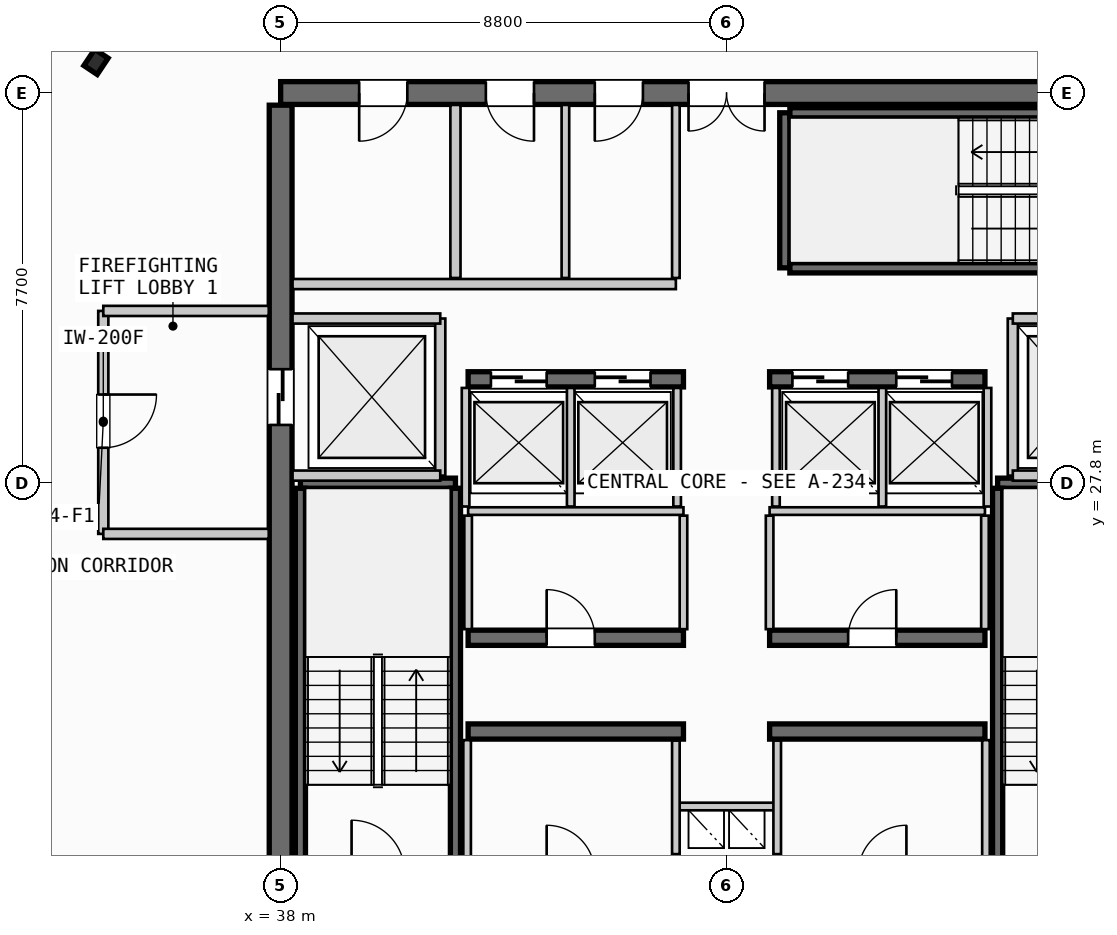
"""IFC4 building model, lengths in metres.
Left out: names, types, materials, properties, quantities, classifications, styles, units other than length and angle.
Written with IfcOpenShell. Run it as: python <this file> out.ifc"""

import sys

from ifc_helpers import new_model, si_unit, direction, frame, frame_2d, origin, origin_2d, place, context, subcontext, project, spatial, rectangle, i_section, extrude, source, transform, mapped, element, fill, save


model = new_model("IFC4")
c1 = context("Model", 3, precision=1e-05, world=origin(), true_north=direction((0.0, 1.0)))
c2 = subcontext(c1, "Body", "Model", "MODEL_VIEW")
j1 = project(units=[si_unit("LENGTHUNIT", "METRE"), si_unit("PLANEANGLEUNIT", "RADIAN")], contexts=[c1])
p1 = place(None, origin())
s1 = spatial("IfcSite", under=j1, at=p1, CompositionType="ELEMENT")
p2 = place(p1, origin())
s2 = spatial("IfcBuilding", under=s1, at=p2, CompositionType="ELEMENT")
p3 = place(p2, frame((0.0, 0.0, 245.65)))
s3 = spatial("IfcBuildingStorey", under=s2, at=p3, CompositionType="ELEMENT", Elevation=245.65)
p4 = place(p3, frame((55.6, 35.5, 0.0), z_axis=(0.0, 0.0, 1.0), x_axis=(-1.0, 0.0, 0.0)))
e1 = element("IfcWall", 1, at=p4, inside=s3, PredefinedType="SHEAR", context=c2, shape_type="SweptSolid", body=[
    extrude(rectangle(XDim=17.6, YDim=0.45, at=frame_2d((8.8, 0.0))), origin(), (0.0, 0.0, 1.0), 3.21),
])
p5 = place(p4, frame((8.05, 0.0, 0.0)))
e2 = element("IfcOpeningElement", 2, at=p5, cuts=e1, PredefinedType="OPENING", context=c2, shape_type="SweptSolid", body=[
    extrude(rectangle(XDim=1.5, YDim=2.2, at=frame_2d((0.75, 1.1))), frame((0.0, 0.235, 0.0), z_axis=(0.0, -1.0, 0.0), x_axis=(1.0, 0.0, 0.0)), (0.0, 0.0, 1.0), 0.47),
])
p6 = place(p4, frame((15.1, 0.0, 0.0)))
e3 = element("IfcOpeningElement", 3, at=p6, cuts=e1, PredefinedType="OPENING", context=c2, shape_type="SweptSolid", body=[
    extrude(rectangle(XDim=0.95, YDim=2.15, at=frame_2d((0.475, 1.075))), frame((0.0, 0.235, 0.0), z_axis=(0.0, -1.0, 0.0), x_axis=(1.0, 0.0, 0.0)), (0.0, 0.0, 1.0), 0.47),
])
p7 = place(p4, frame((12.6, 0.0, 0.0)))
e4 = element("IfcOpeningElement", 4, at=p7, cuts=e1, PredefinedType="OPENING", context=c2, shape_type="SweptSolid", body=[
    extrude(rectangle(XDim=0.95, YDim=2.15, at=frame_2d((0.475, 1.075))), frame((0.0, 0.235, 0.0), z_axis=(0.0, -1.0, 0.0), x_axis=(1.0, 0.0, 0.0)), (0.0, 0.0, 1.0), 0.47),
])
p8 = place(p4, frame((10.45, 0.0, 0.0)))
e5 = element("IfcOpeningElement", 5, at=p8, cuts=e1, PredefinedType="OPENING", context=c2, shape_type="SweptSolid", body=[
    extrude(rectangle(XDim=0.95, YDim=2.15, at=frame_2d((0.475, 1.075))), frame((0.0, 0.235, 0.0), z_axis=(0.0, -1.0, 0.0), x_axis=(1.0, 0.0, 0.0)), (0.0, 0.0, 1.0), 0.47),
])
p9 = place(p3, frame((38.0, 35.26, 0.0), z_axis=(0.0, 0.0, 1.0), x_axis=(0.0, -1.0, 0.0)))
e6 = element("IfcWall", 6, at=p9, inside=s3, PredefinedType="SHEAR", context=c2, shape_type="SweptSolid", body=[
    extrude(rectangle(XDim=14.92, YDim=0.45, at=frame_2d((7.46, 0.0))), origin(), (0.0, 0.0, 1.0), 3.21),
])
p10 = place(p9, frame((5.21, 0.0, 0.0)))
e7 = element("IfcOpeningElement", 7, at=p10, cuts=e6, PredefinedType="OPENING", context=c2, shape_type="SweptSolid", body=[
    extrude(rectangle(XDim=1.1, YDim=2.2, at=frame_2d((0.55, 1.1))), frame((0.0, 0.235, 0.0), z_axis=(0.0, -1.0, 0.0), x_axis=(1.0, 0.0, 0.0)), (0.0, 0.0, 1.0), 0.47),
])
for number, where, z_axis, x_axis in (
    (8, (41.7, 22.9, 0.0), (0.0, 0.0, 1.0), (1.0, 0.0, 0.0)),
    (9, (47.65, 22.9, 0.0), (0.0, 0.0, 1.0), (1.0, 0.0, 0.0)),
):
    element("IfcWall", number, at=place(p3, frame(where, z_axis=z_axis, x_axis=x_axis)), inside=s3, PredefinedType="SHEAR", context=c2, shape_type="SweptSolid", body=[
        extrude(rectangle(XDim=4.25, YDim=0.3, at=frame_2d((2.125, 0.0))), origin(), (0.0, 0.0, 1.0), 3.21),
    ])
p11 = place(p3, frame((41.7, 24.75, 0.0), z_axis=(0.0, 0.0, 1.0), x_axis=(1.0, 0.0, 0.0)))
e10 = element("IfcWall", 10, at=p11, inside=s3, PredefinedType="SHEAR", context=c2, shape_type="SweptSolid", body=[
    extrude(rectangle(XDim=4.25, YDim=0.3, at=frame_2d((2.125, 0.0))), origin(), (0.0, 0.0, 1.0), 3.21),
])
p12 = place(p11, frame((1.55, 0.0, 0.0)))
e11 = element("IfcOpeningElement", 11, at=p12, cuts=e10, PredefinedType="OPENING", context=c2, shape_type="SweptSolid", body=[
    extrude(rectangle(XDim=0.95, YDim=2.15, at=frame_2d((0.475, 1.075))), frame((0.0, 0.16, 0.0), z_axis=(0.0, -1.0, 0.0), x_axis=(1.0, 0.0, 0.0)), (0.0, 0.0, 1.0), 0.32),
])
p13 = place(p3, frame((47.65, 24.75, 0.0), z_axis=(0.0, 0.0, 1.0), x_axis=(1.0, 0.0, 0.0)))
e12 = element("IfcWall", 12, at=p13, inside=s3, PredefinedType="SHEAR", context=c2, shape_type="SweptSolid", body=[
    extrude(rectangle(XDim=4.25, YDim=0.3, at=frame_2d((2.125, 0.0))), origin(), (0.0, 0.0, 1.0), 3.21),
])
p14 = place(p13, frame((1.55, 0.0, 0.0)))
e13 = element("IfcOpeningElement", 13, at=p14, cuts=e12, PredefinedType="OPENING", context=c2, shape_type="SweptSolid", body=[
    extrude(rectangle(XDim=0.95, YDim=2.15, at=frame_2d((0.475, 1.075))), frame((0.0, 0.16, 0.0), z_axis=(0.0, -1.0, 0.0), x_axis=(1.0, 0.0, 0.0)), (0.0, 0.0, 1.0), 0.32),
])
p15 = place(p3, frame((41.7, 29.85, 0.0), z_axis=(0.0, 0.0, 1.0), x_axis=(1.0, 0.0, 0.0)))
e14 = element("IfcWall", 14, at=p15, inside=s3, PredefinedType="SHEAR", context=c2, shape_type="SweptSolid", body=[
    extrude(rectangle(XDim=4.25, YDim=0.3, at=frame_2d((2.125, 0.0))), origin(), (0.0, 0.0, 1.0), 3.21),
])
p16 = place(p15, frame((0.45, 0.0, 0.0)))
e15 = element("IfcOpeningElement", 15, at=p16, cuts=e14, PredefinedType="OPENING", context=c2, shape_type="SweptSolid", body=[
    extrude(rectangle(XDim=1.1, YDim=2.2, at=frame_2d((0.55, 1.1))), frame((0.0, 0.16, 0.0), z_axis=(0.0, -1.0, 0.0), x_axis=(1.0, 0.0, 0.0)), (0.0, 0.0, 1.0), 0.32),
])
p17 = place(p15, frame((2.5, 0.0, 0.0)))
e16 = element("IfcOpeningElement", 16, at=p17, cuts=e14, PredefinedType="OPENING", context=c2, shape_type="SweptSolid", body=[
    extrude(rectangle(XDim=1.1, YDim=2.2, at=frame_2d((0.55, 1.1))), frame((0.0, 0.16, 0.0), z_axis=(0.0, -1.0, 0.0), x_axis=(1.0, 0.0, 0.0)), (0.0, 0.0, 1.0), 0.32),
])
p18 = place(p3, frame((47.65, 29.85, 0.0), z_axis=(0.0, 0.0, 1.0), x_axis=(1.0, 0.0, 0.0)))
e17 = element("IfcWall", 17, at=p18, inside=s3, PredefinedType="SHEAR", context=c2, shape_type="SweptSolid", body=[
    extrude(rectangle(XDim=4.25, YDim=0.3, at=frame_2d((2.125, 0.0))), origin(), (0.0, 0.0, 1.0), 3.21),
])
p19 = place(p18, frame((0.45, 0.0, 0.0)))
e18 = element("IfcOpeningElement", 18, at=p19, cuts=e17, PredefinedType="OPENING", context=c2, shape_type="SweptSolid", body=[
    extrude(rectangle(XDim=1.1, YDim=2.2, at=frame_2d((0.55, 1.1))), frame((0.0, 0.16, 0.0), z_axis=(0.0, -1.0, 0.0), x_axis=(1.0, 0.0, 0.0)), (0.0, 0.0, 1.0), 0.32),
])
p20 = place(p18, frame((2.5, 0.0, 0.0)))
e19 = element("IfcOpeningElement", 19, at=p20, cuts=e17, PredefinedType="OPENING", context=c2, shape_type="SweptSolid", body=[
    extrude(rectangle(XDim=1.1, YDim=2.2, at=frame_2d((0.55, 1.1))), frame((0.0, 0.16, 0.0), z_axis=(0.0, -1.0, 0.0), x_axis=(1.0, 0.0, 0.0)), (0.0, 0.0, 1.0), 0.32),
])
m1 = source(origin(), c2, "Body", "SweptSolid", [
    extrude(i_section(OverallWidth=0.387, OverallDepth=0.316, WebThickness=0.019, FlangeThickness=0.028, FilletRadius=0.015, at=origin_2d()), origin(), (0.0, 0.0, 1.0), 3.21),
])
p21 = place(p3, frame((34.356, 36.115, 0.0), z_axis=(0.0, 0.0, 1.0), x_axis=(-0.831469612303, 0.55557023302, 0.0)))
e20 = element("IfcColumn", 20, at=p21, inside=s3, PredefinedType="COLUMN", context=c2, shape_type="MappedRepresentation", body=[
    mapped(m1, transform((0.0, 0.0, 0.0), scale=1.0)),
])
p22 = place(p3, frame((38.39, 27.8, 0.0), z_axis=(0.0, 0.0, 1.0), x_axis=(1.0, 0.0, 0.0)))
e21 = element("IfcWall", 21, at=p22, inside=s3, PredefinedType="SHEAR", context=c2, shape_type="SweptSolid", body=[
    extrude(rectangle(XDim=3.06, YDim=0.2, at=frame_2d((1.53, 0.0))), origin(), (0.0, 0.0, 1.0), 3.21),
])
for number, where, z_axis, x_axis in (
    (22, (41.45, 27.7, 0.0), (0.0, 0.0, 1.0), (0.0, -1.0, 0.0)),
    (23, (38.39, 20.35, 0.0), (0.0, 0.0, 1.0), (0.0, 1.0, 0.0)),
):
    element("IfcWall", number, at=place(p3, frame(where, z_axis=z_axis, x_axis=x_axis)), inside=s3, PredefinedType="SHEAR", context=c2, shape_type="SweptSolid", body=[
        extrude(rectangle(XDim=7.35, YDim=0.2, at=frame_2d((3.675, 0.0))), origin(), (0.0, 0.0, 1.0), 3.21),
    ])
p23 = place(p3, frame((52.15, 27.8, 0.0), z_axis=(0.0, 0.0, 1.0), x_axis=(1.0, 0.0, 0.0)))
e24 = element("IfcWall", 24, at=p23, inside=s3, PredefinedType="SHEAR", context=c2, shape_type="SweptSolid", body=[
    extrude(rectangle(XDim=3.06, YDim=0.2, at=frame_2d((1.53, 0.0))), origin(), (0.0, 0.0, 1.0), 3.21),
])
p24 = place(p3, frame((52.15, 20.35, 0.0), z_axis=(0.0, 0.0, 1.0), x_axis=(0.0, 1.0, 0.0)))
e25 = element("IfcWall", 25, at=p24, inside=s3, PredefinedType="SHEAR", context=c2, shape_type="SweptSolid", body=[
    extrude(rectangle(XDim=7.35, YDim=0.2, at=frame_2d((3.675, 0.0))), origin(), (0.0, 0.0, 1.0), 3.21),
])
p25 = place(p3, frame((47.95, 32.05, 0.0), z_axis=(0.0, 0.0, 1.0), x_axis=(0.0, 1.0, 0.0)))
e26 = element("IfcWall", 26, at=p25, inside=s3, PredefinedType="SHEAR", context=c2, shape_type="SweptSolid", body=[
    extrude(rectangle(XDim=3.06, YDim=0.2, at=frame_2d((1.53, 0.0))), origin(), (0.0, 0.0, 1.0), 3.21),
])
for number, where, z_axis, x_axis in (
    (27, (48.05, 35.11, 0.0), (0.0, 0.0, 1.0), (1.0, 0.0, 0.0)),
    (28, (55.4, 32.05, 0.0), (0.0, 0.0, 1.0), (-1.0, 0.0, 0.0)),
):
    element("IfcWall", number, at=place(p3, frame(where, z_axis=z_axis, x_axis=x_axis)), inside=s3, PredefinedType="SHEAR", context=c2, shape_type="SweptSolid", body=[
        extrude(rectangle(XDim=7.35, YDim=0.2, at=frame_2d((3.675, 0.0))), origin(), (0.0, 0.0, 1.0), 3.21),
    ])
p26 = place(p3, frame((45.8, 21.42, 0.0), z_axis=(0.0, 0.0, 1.0), x_axis=(1.0, 0.0, 0.0)))
e29 = element("IfcWall", 29, at=p26, inside=s3, PredefinedType="PARTITIONING", context=c2, shape_type="SweptSolid", body=[
    extrude(rectangle(XDim=2.0, YDim=0.15, at=frame_2d((1.0, 0.0))), origin(), (0.0, 0.0, 1.0), 2.28),
])
for number, where, z_axis, x_axis in (
    (30, (45.8, 20.48, 0.0), (0.0, 0.0, 1.0), (0.0, 1.0, 0.0)),
    (31, (47.8, 20.48, 0.0), (0.0, 0.0, 1.0), (0.0, 1.0, 0.0)),
):
    element("IfcWall", number, at=place(p3, frame(where, z_axis=z_axis, x_axis=x_axis)), inside=s3, PredefinedType="PARTITIONING", context=c2, shape_type="SweptSolid", body=[
        extrude(rectangle(XDim=2.24, YDim=0.15, at=frame_2d((1.12, 0.0))), origin(), (0.0, 0.0, 1.0), 2.28),
    ])
p27 = place(p3, frame((41.15, 27.95, 0.0), z_axis=(0.0, 0.0, 1.0), x_axis=(0.0, 1.0, 0.0)))
e32 = element("IfcWall", 32, at=p27, inside=s3, PredefinedType="PARTITIONING", context=c2, shape_type="SweptSolid", body=[
    extrude(rectangle(XDim=3.1, YDim=0.2, at=frame_2d((1.55, 0.0))), origin(), (0.0, 0.0, 1.0), 2.28),
])
for number, where, z_axis, x_axis in (
    (33, (38.235, 27.95, 0.0), (0.0, 0.0, 1.0), (1.0, 0.0, 0.0)),
    (34, (38.235, 31.05, 0.0), (0.0, 0.0, 1.0), (1.0, 0.0, 0.0)),
):
    element("IfcWall", number, at=place(p3, frame(where, z_axis=z_axis, x_axis=x_axis)), inside=s3, PredefinedType="PARTITIONING", context=c2, shape_type="SweptSolid", body=[
        extrude(rectangle(XDim=2.915, YDim=0.2, at=frame_2d((1.458, 0.0))), origin(), (0.0, 0.0, 1.0), 2.28),
    ])
p28 = place(p3, frame((34.5, 31.2, 0.0), z_axis=(0.0, 0.0, 1.0), x_axis=(0.0, -1.0, 0.0)))
e35 = element("IfcWall", 35, at=p28, inside=s3, PredefinedType="PARTITIONING", context=c2, shape_type="SweptSolid", body=[
    extrude(rectangle(XDim=4.4, YDim=0.2, at=frame_2d((2.2, 0.0))), origin(), (0.0, 0.0, 1.0), 2.28),
])
p29 = place(p28, frame((1.65, 0.0, 0.0)))
e36 = element("IfcOpeningElement", 36, at=p29, cuts=e35, PredefinedType="OPENING", context=c2, shape_type="SweptSolid", body=[
    extrude(rectangle(XDim=1.05, YDim=2.15, at=frame_2d((0.525, 1.075))), frame((0.0, 0.11, 0.0), z_axis=(0.0, -1.0, 0.0), x_axis=(1.0, 0.0, 0.0)), (0.0, 0.0, 1.0), 0.22),
])
for number, where, z_axis, x_axis in (
    (37, (34.5, 26.8, 0.0), (0.0, 0.0, 1.0), (1.0, 0.0, 0.0)),
    (38, (34.5, 31.2, 0.0), (0.0, 0.0, 1.0), (1.0, 0.0, 0.0)),
):
    element("IfcWall", number, at=place(p3, frame(where, z_axis=z_axis, x_axis=x_axis)), inside=s3, PredefinedType="PARTITIONING", context=c2, shape_type="SweptSolid", body=[
        extrude(rectangle(XDim=3.265, YDim=0.2, at=frame_2d((1.632, 0.0))), origin(), (0.0, 0.0, 1.0), 2.28),
    ])
p30 = place(p3, frame((52.45, 27.95, 0.0), z_axis=(0.0, 0.0, 1.0), x_axis=(0.0, 1.0, 0.0)))
e39 = element("IfcWall", 39, at=p30, inside=s3, PredefinedType="PARTITIONING", context=c2, shape_type="SweptSolid", body=[
    extrude(rectangle(XDim=3.1, YDim=0.2, at=frame_2d((1.55, 0.0))), origin(), (0.0, 0.0, 1.0), 2.28),
])
for number, where, z_axis, x_axis in (
    (40, (52.45, 27.95, 0.0), (0.0, 0.0, 1.0), (1.0, 0.0, 0.0)),
    (41, (52.45, 31.05, 0.0), (0.0, 0.0, 1.0), (1.0, 0.0, 0.0)),
):
    element("IfcWall", number, at=place(p3, frame(where, z_axis=z_axis, x_axis=x_axis)), inside=s3, PredefinedType="PARTITIONING", context=c2, shape_type="SweptSolid", body=[
        extrude(rectangle(XDim=2.915, YDim=0.2, at=frame_2d((1.458, 0.0))), origin(), (0.0, 0.0, 1.0), 2.28),
    ])
for number, where, z_axis, x_axis in (
    (42, (41.68, 20.335, 0.0), (0.0, 0.0, 1.0), (0.0, 1.0, 0.0)),
    (43, (51.92, 20.335, 0.0), (0.0, 0.0, 1.0), (0.0, 1.0, 0.0)),
):
    element("IfcWall", number, at=place(p3, frame(where, z_axis=z_axis, x_axis=x_axis)), inside=s3, PredefinedType="PARTITIONING", context=c2, shape_type="SweptSolid", body=[
        extrude(rectangle(XDim=2.395, YDim=0.15, at=frame_2d((1.198, 0.0))), origin(), (0.0, 0.0, 1.0), 2.28),
    ])
for number, where, z_axis, x_axis in (
    (44, (41.7, 27.25, 0.0), (0.0, 0.0, 1.0), (1.0, 0.0, 0.0)),
    (45, (47.65, 27.25, 0.0), (0.0, 0.0, 1.0), (1.0, 0.0, 0.0)),
):
    element("IfcWall", number, at=place(p3, frame(where, z_axis=z_axis, x_axis=x_axis)), inside=s3, PredefinedType="PARTITIONING", context=c2, shape_type="SweptSolid", body=[
        extrude(rectangle(XDim=4.25, YDim=0.15, at=frame_2d((2.125, 0.0))), origin(), (0.0, 0.0, 1.0), 2.28),
    ])
for number, where, z_axis, x_axis in (
    (46, (41.7, 24.92, 0.0), (0.0, 0.0, 1.0), (0.0, 1.0, 0.0)),
    (47, (45.95, 24.92, 0.0), (0.0, 0.0, 1.0), (0.0, 1.0, 0.0)),
    (48, (47.65, 24.92, 0.0), (0.0, 0.0, 1.0), (0.0, 1.0, 0.0)),
    (49, (51.9, 24.92, 0.0), (0.0, 0.0, 1.0), (0.0, 1.0, 0.0)),
):
    element("IfcWall", number, at=place(p3, frame(where, z_axis=z_axis, x_axis=x_axis)), inside=s3, PredefinedType="PARTITIONING", context=c2, shape_type="SweptSolid", body=[
        extrude(rectangle(XDim=2.24, YDim=0.15, at=frame_2d((1.12, 0.0))), origin(), (0.0, 0.0, 1.0), 2.28),
    ])
for number, where, z_axis, x_axis in (
    (50, (41.65, 27.34, 0.0), (0.0, 0.0, 1.0), (0.0, 1.0, 0.0)),
    (51, (43.725, 27.34, 0.0), (0.0, 0.0, 1.0), (0.0, 1.0, 0.0)),
    (52, (45.825, 27.34, 0.0), (0.0, 0.0, 1.0), (0.0, 1.0, 0.0)),
    (53, (47.775, 27.34, 0.0), (0.0, 0.0, 1.0), (0.0, 1.0, 0.0)),
    (54, (49.875, 27.34, 0.0), (0.0, 0.0, 1.0), (0.0, 1.0, 0.0)),
    (55, (51.95, 27.34, 0.0), (0.0, 0.0, 1.0), (0.0, 1.0, 0.0)),
):
    element("IfcWall", number, at=place(p3, frame(where, z_axis=z_axis, x_axis=x_axis)), inside=s3, PredefinedType="PARTITIONING", context=c2, shape_type="SweptSolid", body=[
        extrude(rectangle(XDim=2.34, YDim=0.15, at=frame_2d((1.17, 0.0))), origin(), (0.0, 0.0, 1.0), 2.28),
    ])
p31 = place(p3, frame((41.45, 31.85, 0.0), z_axis=(0.0, 0.0, 1.0), x_axis=(0.0, 1.0, 0.0)))
e56 = element("IfcWall", 56, at=p31, inside=s3, PredefinedType="PARTITIONING", context=c2, shape_type="SweptSolid", body=[
    extrude(rectangle(XDim=3.415, YDim=0.2, at=frame_2d((1.708, 0.0))), origin(), (0.0, 0.0, 1.0), 2.28),
])
p32 = place(p3, frame((38.235, 31.73, 0.0), z_axis=(0.0, 0.0, 1.0), x_axis=(1.0, 0.0, 0.0)))
e57 = element("IfcWall", 57, at=p32, inside=s3, PredefinedType="PARTITIONING", context=c2, shape_type="SweptSolid", body=[
    extrude(rectangle(XDim=7.565, YDim=0.2, at=frame_2d((3.782, 0.0))), origin(), (0.0, 0.0, 1.0), 2.28),
])
p33 = place(p3, frame((45.8, 31.85, 0.0), z_axis=(0.0, 0.0, 1.0), x_axis=(0.0, 1.0, 0.0)))
e58 = element("IfcWall", 58, at=p33, inside=s3, PredefinedType="PARTITIONING", context=c2, shape_type="SweptSolid", body=[
    extrude(rectangle(XDim=3.415, YDim=0.15, at=frame_2d((1.708, 0.0))), origin(), (0.0, 0.0, 1.0), 2.28),
])
p34 = place(p3, frame((43.62, 31.85, 0.0), z_axis=(0.0, 0.0, 1.0), x_axis=(0.0, 1.0, 0.0)))
e59 = element("IfcWall", 59, at=p34, inside=s3, PredefinedType="PLUMBINGWALL", context=c2, shape_type="SweptSolid", body=[
    extrude(rectangle(XDim=3.415, YDim=0.15, at=frame_2d((1.708, 0.0))), origin(), (0.0, 0.0, 1.0), 2.28),
])
m2 = source(origin(), c2, "Body", "SweptSolid", [
    extrude(rectangle(XDim=1.5, YDim=2.2, at=frame_2d((0.75, 1.1))), frame((0.0, 0.025, 0.0), z_axis=(0.0, -1.0, 0.0), x_axis=(1.0, 0.0, 0.0)), (0.0, 0.0, 1.0), 0.05),
])
p35 = place(p5, origin())
e60 = element("IfcDoor", 60, at=p35, inside=s3, OperationType="DOUBLE_DOOR_SINGLE_SWING", PredefinedType="DOOR", context=c2, shape_type="MappedRepresentation", body=[
    mapped(m2, transform((0.0, 0.0, 0.0), scale=1.0)),
])
fill(e2, e60)
m3 = source(origin(), c2, "Body", "SweptSolid", [
    extrude(rectangle(XDim=1.1, YDim=2.2, at=frame_2d((0.55, 1.1))), frame((0.0, 0.025, 0.0), z_axis=(0.0, -1.0, 0.0), x_axis=(1.0, 0.0, 0.0)), (0.0, 0.0, 1.0), 0.05),
])
p36 = place(p10, origin())
e61 = element("IfcDoor", 61, at=p36, inside=s3, OperationType="SLIDING_TO_LEFT", PredefinedType="DOOR", context=c2, shape_type="MappedRepresentation", body=[
    mapped(m3, transform((0.0, 0.0, 0.0), scale=1.0)),
])
fill(e7, e61)
m4 = source(origin(), c2, "Body", "SweptSolid", [
    extrude(rectangle(XDim=0.95, YDim=2.15, at=frame_2d((0.475, 1.075))), frame((0.0, 0.025, 0.0), z_axis=(0.0, -1.0, 0.0), x_axis=(1.0, 0.0, 0.0)), (0.0, 0.0, 1.0), 0.05),
])
p37 = place(p12, origin())
e62 = element("IfcDoor", 62, at=p37, inside=s3, OperationType="SINGLE_SWING_LEFT", PredefinedType="DOOR", context=c2, shape_type="MappedRepresentation", body=[
    mapped(m4, transform((0.0, 0.0, 0.0), scale=1.0)),
])
fill(e11, e62)
p38 = place(p14, origin())
e63 = element("IfcDoor", 63, at=p38, inside=s3, OperationType="SINGLE_SWING_RIGHT", PredefinedType="DOOR", context=c2, shape_type="MappedRepresentation", body=[
    mapped(m4, transform((0.0, 0.0, 0.0), scale=1.0)),
])
fill(e13, e63)
p39 = place(p16, origin())
e64 = element("IfcDoor", 64, at=p39, inside=s3, OperationType="SLIDING_TO_LEFT", PredefinedType="DOOR", context=c2, shape_type="MappedRepresentation", body=[
    mapped(m3, transform((0.0, 0.0, 0.0), scale=1.0)),
])
fill(e15, e64)
p40 = place(p17, origin())
e65 = element("IfcDoor", 65, at=p40, inside=s3, OperationType="SLIDING_TO_LEFT", PredefinedType="DOOR", context=c2, shape_type="MappedRepresentation", body=[
    mapped(m3, transform((0.0, 0.0, 0.0), scale=1.0)),
])
fill(e16, e65)
p41 = place(p19, origin())
e66 = element("IfcDoor", 66, at=p41, inside=s3, OperationType="SLIDING_TO_LEFT", PredefinedType="DOOR", context=c2, shape_type="MappedRepresentation", body=[
    mapped(m3, transform((0.0, 0.0, 0.0), scale=1.0)),
])
fill(e18, e66)
p42 = place(p20, origin())
e67 = element("IfcDoor", 67, at=p42, inside=s3, OperationType="SLIDING_TO_LEFT", PredefinedType="DOOR", context=c2, shape_type="MappedRepresentation", body=[
    mapped(m3, transform((0.0, 0.0, 0.0), scale=1.0)),
])
fill(e19, e67)
p43 = place(p6, origin())
e68 = element("IfcDoor", 68, at=p43, inside=s3, OperationType="SINGLE_SWING_RIGHT", PredefinedType="DOOR", context=c2, shape_type="MappedRepresentation", body=[
    mapped(m4, transform((0.0, 0.0, 0.0), scale=1.0)),
])
fill(e3, e68)
p44 = place(p7, origin())
e69 = element("IfcDoor", 69, at=p44, inside=s3, OperationType="SINGLE_SWING_LEFT", PredefinedType="DOOR", context=c2, shape_type="MappedRepresentation", body=[
    mapped(m4, transform((0.0, 0.0, 0.0), scale=1.0)),
])
fill(e4, e69)
p45 = place(p8, origin())
e70 = element("IfcDoor", 70, at=p45, inside=s3, OperationType="SINGLE_SWING_RIGHT", PredefinedType="DOOR", context=c2, shape_type="MappedRepresentation", body=[
    mapped(m4, transform((0.0, 0.0, 0.0), scale=1.0)),
])
fill(e5, e70)
m5 = source(origin(), c2, "Body", "SweptSolid", [
    extrude(rectangle(XDim=1.05, YDim=2.15, at=frame_2d((0.525, 1.075))), frame((0.0, 0.025, 0.0), z_axis=(0.0, -1.0, 0.0), x_axis=(1.0, 0.0, 0.0)), (0.0, 0.0, 1.0), 0.05),
])
p46 = place(p29, origin())
e71 = element("IfcDoor", 71, at=p46, inside=s3, OperationType="SINGLE_SWING_LEFT", PredefinedType="DOOR", context=c2, shape_type="MappedRepresentation", body=[
    mapped(m5, transform((0.0, 0.0, 0.0), scale=1.0)),
])
fill(e36, e71)
save(model, sys.argv[1])
